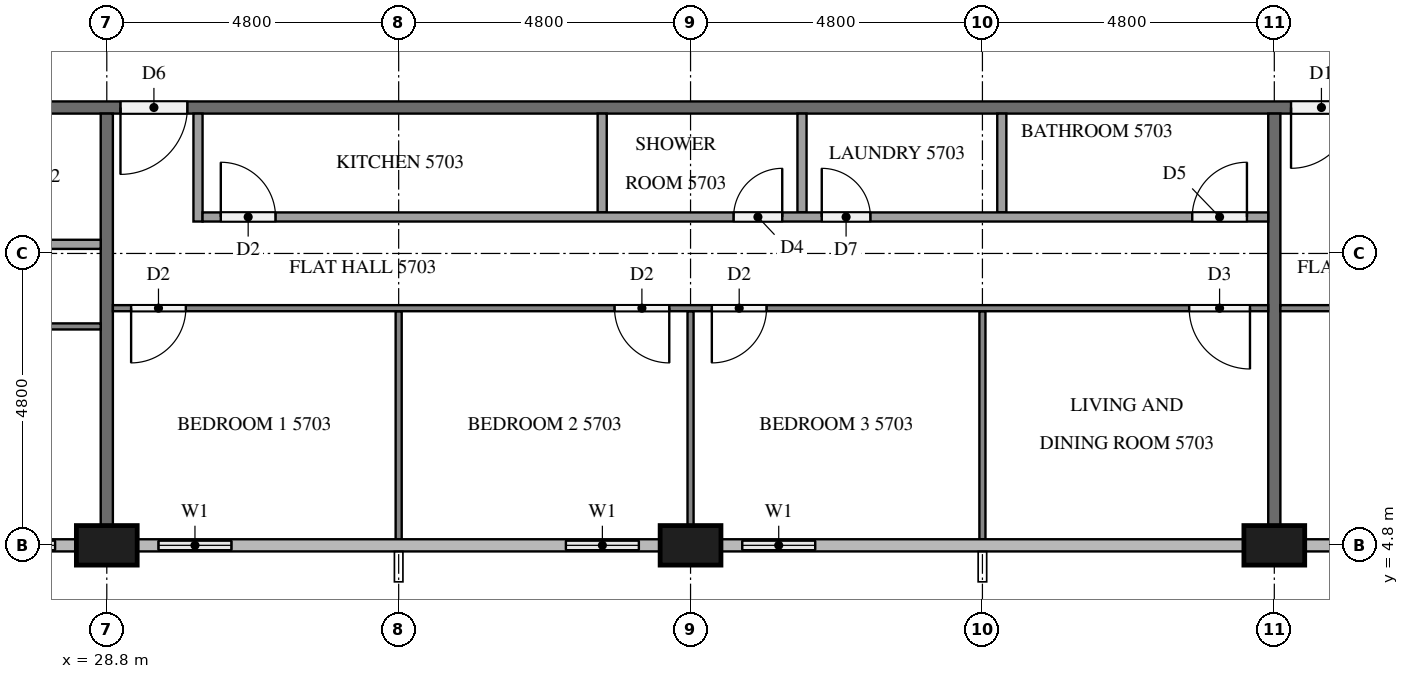
"""IFC4 building model, lengths in metres.
Left out: names, types, materials, properties, quantities, classifications, styles, units other than length and angle.
Written with IfcOpenShell. Run it as: python <this file> out.ifc"""

import sys

from ifc_helpers import new_model, si_unit, direction, frame, frame_2d, origin, origin_2d, place, context, subcontext, project, spatial, rectangle, extrude, element, fill, save


model = new_model("IFC4")
c1 = context("Model", 3, precision=1e-05, world=origin(), true_north=direction((0.0, 1.0)))
c2 = subcontext(c1, "Body", "Model", "MODEL_VIEW")
j1 = project(units=[si_unit("LENGTHUNIT", "METRE"), si_unit("PLANEANGLEUNIT", "RADIAN")], contexts=[c1])
p1 = place(None, origin())
s1 = spatial("IfcSite", under=j1, at=p1, CompositionType="ELEMENT")
p2 = place(p1, origin())
s2 = spatial("IfcBuilding", under=s1, at=p2, CompositionType="ELEMENT")
p3 = place(p2, frame((0.0, 0.0, 219.3)))
s3 = spatial("IfcBuildingStorey", under=s2, at=p3, CompositionType="ELEMENT", Elevation=219.3)
for number, where, z_axis, x_axis in (
    (1, (28.8, 4.8, 0.0), (0.0, 0.0, 1.0), (1.0, 0.0, 0.0)),
    (2, (38.4, 4.8, 0.0), (0.0, 0.0, 1.0), (1.0, 0.0, 0.0)),
    (3, (48.0, 4.8, 0.0), (0.0, 0.0, 1.0), (1.0, 0.0, 0.0)),
):
    element("IfcColumn", number, at=place(p3, frame(where, z_axis=z_axis, x_axis=x_axis)), inside=s3, PredefinedType="COLUMN", context=c2, shape_type="SweptSolid", body=[
        extrude(rectangle(XDim=1.0, YDim=0.65, at=origin_2d()), origin(), (0.0, 0.0, 1.0), 3.2),
    ])
p4 = place(p3, frame((26.4, 4.8, 0.0), z_axis=(0.0, 0.0, 1.0), x_axis=(1.0, 0.0, 0.0)))
e4 = element("IfcWall", 4, at=p4, inside=s3, PredefinedType="SOLIDWALL", context=c2, shape_type="SweptSolid", body=[
    extrude(rectangle(XDim=1.9, YDim=0.15, at=frame_2d((0.95, 0.0))), origin(), (0.0, 0.0, 1.0), 3.2),
])
p5 = place(p4, frame((0.35, 0.0, 0.9)))
e5 = element("IfcOpeningElement", 5, at=p5, cuts=e4, PredefinedType="OPENING", context=c2, shape_type="SweptSolid", body=[
    extrude(rectangle(XDim=1.2, YDim=1.4, at=frame_2d((0.6, 0.7))), frame((0.0, 0.085, 0.0), z_axis=(0.0, -1.0, 0.0), x_axis=(1.0, 0.0, 0.0)), (0.0, 0.0, 1.0), 0.17),
])
p6 = place(p3, frame((29.3, 4.8, 0.0), z_axis=(0.0, 0.0, 1.0), x_axis=(1.0, 0.0, 0.0)))
e6 = element("IfcWall", 6, at=p6, inside=s3, PredefinedType="SOLIDWALL", context=c2, shape_type="SweptSolid", body=[
    extrude(rectangle(XDim=1.9, YDim=0.15, at=frame_2d((0.95, 0.0))), origin(), (0.0, 0.0, 1.0), 3.2),
])
p7 = place(p6, frame((0.35, 0.0, 0.9)))
e7 = element("IfcOpeningElement", 7, at=p7, cuts=e6, PredefinedType="OPENING", context=c2, shape_type="SweptSolid", body=[
    extrude(rectangle(XDim=1.2, YDim=1.4, at=frame_2d((0.6, 0.7))), frame((0.0, 0.085, 0.0), z_axis=(0.0, -1.0, 0.0), x_axis=(1.0, 0.0, 0.0)), (0.0, 0.0, 1.0), 0.17),
])
p8 = place(p3, frame((36.0, 4.8, 0.0), z_axis=(0.0, 0.0, 1.0), x_axis=(1.0, 0.0, 0.0)))
e8 = element("IfcWall", 8, at=p8, inside=s3, PredefinedType="SOLIDWALL", context=c2, shape_type="SweptSolid", body=[
    extrude(rectangle(XDim=1.9, YDim=0.15, at=frame_2d((0.95, 0.0))), origin(), (0.0, 0.0, 1.0), 3.2),
])
p9 = place(p8, frame((0.35, 0.0, 0.9)))
e9 = element("IfcOpeningElement", 9, at=p9, cuts=e8, PredefinedType="OPENING", context=c2, shape_type="SweptSolid", body=[
    extrude(rectangle(XDim=1.2, YDim=1.4, at=frame_2d((0.6, 0.7))), frame((0.0, 0.085, 0.0), z_axis=(0.0, -1.0, 0.0), x_axis=(1.0, 0.0, 0.0)), (0.0, 0.0, 1.0), 0.17),
])
p10 = place(p3, frame((38.9, 4.8, 0.0), z_axis=(0.0, 0.0, 1.0), x_axis=(1.0, 0.0, 0.0)))
e10 = element("IfcWall", 10, at=p10, inside=s3, PredefinedType="SOLIDWALL", context=c2, shape_type="SweptSolid", body=[
    extrude(rectangle(XDim=1.9, YDim=0.15, at=frame_2d((0.95, 0.0))), origin(), (0.0, 0.0, 1.0), 3.2),
])
p11 = place(p10, frame((0.35, 0.0, 0.9)))
e11 = element("IfcOpeningElement", 11, at=p11, cuts=e10, PredefinedType="OPENING", context=c2, shape_type="SweptSolid", body=[
    extrude(rectangle(XDim=1.2, YDim=1.4, at=frame_2d((0.6, 0.7))), frame((0.0, 0.085, 0.0), z_axis=(0.0, -1.0, 0.0), x_axis=(1.0, 0.0, 0.0)), (0.0, 0.0, 1.0), 0.17),
])
p12 = place(p3, frame((50.5, 12.0, 0.0), z_axis=(0.0, 0.0, 1.0), x_axis=(-1.0, 0.0, 0.0)))
e12 = element("IfcWall", 12, at=p12, inside=s3, PredefinedType="PARTITIONING", context=c2, shape_type="SweptSolid", body=[
    extrude(rectangle(XDim=38.6, YDim=0.2, at=frame_2d((19.3, 0.0))), origin(), (0.0, 0.0, 1.0), 3.2),
])
p13 = place(p12, frame((36.375, 0.0, 0.0)))
e13 = element("IfcOpeningElement", 13, at=p13, cuts=e12, PredefinedType="OPENING", context=c2, shape_type="SweptSolid", body=[
    extrude(rectangle(XDim=1.0, YDim=2.1, at=frame_2d((0.5, 1.05))), frame((0.0, 0.11, 0.0), z_axis=(0.0, -1.0, 0.0), x_axis=(1.0, 0.0, 0.0)), (0.0, 0.0, 1.0), 0.22),
])
p14 = place(p12, frame((34.825, 0.0, 0.0)))
e14 = element("IfcOpeningElement", 14, at=p14, cuts=e12, PredefinedType="OPENING", context=c2, shape_type="SweptSolid", body=[
    extrude(rectangle(XDim=1.0, YDim=2.1, at=frame_2d((0.5, 1.05))), frame((0.0, 0.11, 0.0), z_axis=(0.0, -1.0, 0.0), x_axis=(1.0, 0.0, 0.0)), (0.0, 0.0, 1.0), 0.22),
])
p15 = place(p12, frame((20.375, 0.0, 0.0)))
e15 = element("IfcOpeningElement", 15, at=p15, cuts=e12, PredefinedType="OPENING", context=c2, shape_type="SweptSolid", body=[
    extrude(rectangle(XDim=1.1, YDim=2.1, at=frame_2d((0.55, 1.05))), frame((0.0, 0.11, 0.0), z_axis=(0.0, -1.0, 0.0), x_axis=(1.0, 0.0, 0.0)), (0.0, 0.0, 1.0), 0.22),
])
p16 = place(p12, frame((1.225, 0.0, 0.0)))
e16 = element("IfcOpeningElement", 16, at=p16, cuts=e12, PredefinedType="OPENING", context=c2, shape_type="SweptSolid", body=[
    extrude(rectangle(XDim=1.0, YDim=2.1, at=frame_2d((0.5, 1.05))), frame((0.0, 0.11, 0.0), z_axis=(0.0, -1.0, 0.0), x_axis=(1.0, 0.0, 0.0)), (0.0, 0.0, 1.0), 0.22),
])
for number, where, z_axis, x_axis in (
    (17, (28.8, 11.9, 0.0), (0.0, 0.0, 1.0), (0.0, -1.0, 0.0)),
    (18, (48.0, 11.9, 0.0), (0.0, 0.0, 1.0), (0.0, -1.0, 0.0)),
):
    element("IfcWall", number, at=place(p3, frame(where, z_axis=z_axis, x_axis=x_axis)), inside=s3, PredefinedType="PARTITIONING", context=c2, shape_type="SweptSolid", body=[
        extrude(rectangle(XDim=6.775, YDim=0.2, at=frame_2d((3.387, 0.0))), origin(), (0.0, 0.0, 1.0), 3.2),
    ])
p17 = place(p3, frame((28.7, 8.4, 0.0), z_axis=(0.0, 0.0, 1.0), x_axis=(-1.0, 0.0, 0.0)))
e19 = element("IfcWall", 19, at=p17, inside=s3, PredefinedType="PARTITIONING", context=c2, shape_type="SweptSolid", body=[
    extrude(rectangle(XDim=14.2, YDim=0.1, at=frame_2d((7.1, 0.0))), origin(), (0.0, 0.0, 1.0), 3.2),
])
p18 = place(p17, frame((12.9, 0.0, 0.0)))
e20 = element("IfcOpeningElement", 20, at=p18, cuts=e19, PredefinedType="OPENING", context=c2, shape_type="SweptSolid", body=[
    extrude(rectangle(XDim=1.0, YDim=2.1, at=frame_2d((0.5, 1.05))), frame((0.0, 0.06, 0.0), z_axis=(0.0, -1.0, 0.0), x_axis=(1.0, 0.0, 0.0)), (0.0, 0.0, 1.0), 0.12),
])
p19 = place(p17, frame((5.05, 0.0, 0.0)))
e21 = element("IfcOpeningElement", 21, at=p19, cuts=e19, PredefinedType="OPENING", context=c2, shape_type="SweptSolid", body=[
    extrude(rectangle(XDim=0.9, YDim=2.1, at=frame_2d((0.45, 1.05))), frame((0.0, 0.06, 0.0), z_axis=(0.0, -1.0, 0.0), x_axis=(1.0, 0.0, 0.0)), (0.0, 0.0, 1.0), 0.12),
])
p20 = place(p17, frame((3.45, 0.0, 0.0)))
e22 = element("IfcOpeningElement", 22, at=p20, cuts=e19, PredefinedType="OPENING", context=c2, shape_type="SweptSolid", body=[
    extrude(rectangle(XDim=0.9, YDim=2.1, at=frame_2d((0.45, 1.05))), frame((0.0, 0.06, 0.0), z_axis=(0.0, -1.0, 0.0), x_axis=(1.0, 0.0, 0.0)), (0.0, 0.0, 1.0), 0.12),
])
p21 = place(p3, frame((15.975, 9.75, 0.0), z_axis=(0.0, 0.0, 1.0), x_axis=(1.0, 0.0, 0.0)))
e23 = element("IfcWall", 23, at=p21, inside=s3, PredefinedType="PARTITIONING", context=c2, shape_type="SweptSolid", body=[
    extrude(rectangle(XDim=12.725, YDim=0.15, at=frame_2d((6.362, 0.0))), origin(), (0.0, 0.0, 1.0), 3.2),
])
p22 = place(p21, frame((0.3, 0.0, 0.0)))
e24 = element("IfcOpeningElement", 24, at=p22, cuts=e23, PredefinedType="OPENING", context=c2, shape_type="SweptSolid", body=[
    extrude(rectangle(XDim=0.8, YDim=2.1, at=frame_2d((0.4, 1.05))), frame((0.0, 0.085, 0.0), z_axis=(0.0, -1.0, 0.0), x_axis=(1.0, 0.0, 0.0)), (0.0, 0.0, 1.0), 0.17),
])
p23 = place(p21, frame((7.585, 0.0, 0.0)))
e25 = element("IfcOpeningElement", 25, at=p23, cuts=e23, PredefinedType="OPENING", context=c2, shape_type="SweptSolid", body=[
    extrude(rectangle(XDim=0.9, YDim=2.1, at=frame_2d((0.45, 1.05))), frame((0.0, 0.085, 0.0), z_axis=(0.0, -1.0, 0.0), x_axis=(1.0, 0.0, 0.0)), (0.0, 0.0, 1.0), 0.17),
])
p24 = place(p21, frame((9.135, 0.0, 0.0)))
e26 = element("IfcOpeningElement", 26, at=p24, cuts=e23, PredefinedType="OPENING", context=c2, shape_type="SweptSolid", body=[
    extrude(rectangle(XDim=0.9, YDim=2.1, at=frame_2d((0.45, 1.05))), frame((0.0, 0.085, 0.0), z_axis=(0.0, -1.0, 0.0), x_axis=(1.0, 0.0, 0.0)), (0.0, 0.0, 1.0), 0.17),
])
p25 = place(p3, frame((33.6, 8.65, 0.0), z_axis=(0.0, 0.0, 1.0), x_axis=(0.0, -1.0, 0.0)))
e27 = element("IfcWall", 27, at=p25, inside=s3, PredefinedType="PARTITIONING", context=c2, shape_type="SweptSolid", body=[
    extrude(rectangle(XDim=3.75, YDim=0.1, at=frame_2d((1.875, 0.0))), origin(), (0.0, 0.0, 1.0), 3.2),
])
p26 = place(p3, frame((38.4, 8.65, 0.0), z_axis=(0.0, 0.0, 1.0), x_axis=(0.0, -1.0, 0.0)))
e28 = element("IfcWall", 28, at=p26, inside=s3, PredefinedType="PARTITIONING", context=c2, shape_type="SweptSolid", body=[
    extrude(rectangle(XDim=3.525, YDim=0.1, at=frame_2d((1.762, 0.0))), origin(), (0.0, 0.0, 1.0), 3.2),
])
p27 = place(p3, frame((43.2, 8.65, 0.0), z_axis=(0.0, 0.0, 1.0), x_axis=(0.0, -1.0, 0.0)))
e29 = element("IfcWall", 29, at=p27, inside=s3, PredefinedType="PARTITIONING", context=c2, shape_type="SweptSolid", body=[
    extrude(rectangle(XDim=3.75, YDim=0.1, at=frame_2d((1.875, 0.0))), origin(), (0.0, 0.0, 1.0), 3.2),
])
p28 = place(p3, frame((47.9, 8.7, 0.0), z_axis=(0.0, 0.0, 1.0), x_axis=(-1.0, 0.0, 0.0)))
e30 = element("IfcWall", 30, at=p28, inside=s3, PredefinedType="PARTITIONING", context=c2, shape_type="SweptSolid", body=[
    extrude(rectangle(XDim=19.0, YDim=0.1, at=frame_2d((9.5, 0.0))), origin(), (0.0, 0.0, 1.0), 3.2),
])
p29 = place(p28, frame((17.8, 0.0, 0.0)))
e31 = element("IfcOpeningElement", 31, at=p29, cuts=e30, PredefinedType="OPENING", context=c2, shape_type="SweptSolid", body=[
    extrude(rectangle(XDim=0.9, YDim=2.1, at=frame_2d((0.45, 1.05))), frame((0.0, 0.06, 0.0), z_axis=(0.0, -1.0, 0.0), x_axis=(1.0, 0.0, 0.0)), (0.0, 0.0, 1.0), 0.12),
])
p30 = place(p28, frame((9.85, 0.0, 0.0)))
e32 = element("IfcOpeningElement", 32, at=p30, cuts=e30, PredefinedType="OPENING", context=c2, shape_type="SweptSolid", body=[
    extrude(rectangle(XDim=0.9, YDim=2.1, at=frame_2d((0.45, 1.05))), frame((0.0, 0.06, 0.0), z_axis=(0.0, -1.0, 0.0), x_axis=(1.0, 0.0, 0.0)), (0.0, 0.0, 1.0), 0.12),
])
p31 = place(p28, frame((8.25, 0.0, 0.0)))
e33 = element("IfcOpeningElement", 33, at=p31, cuts=e30, PredefinedType="OPENING", context=c2, shape_type="SweptSolid", body=[
    extrude(rectangle(XDim=0.9, YDim=2.1, at=frame_2d((0.45, 1.05))), frame((0.0, 0.06, 0.0), z_axis=(0.0, -1.0, 0.0), x_axis=(1.0, 0.0, 0.0)), (0.0, 0.0, 1.0), 0.12),
])
p32 = place(p28, frame((0.3, 0.0, 0.0)))
e34 = element("IfcOpeningElement", 34, at=p32, cuts=e30, PredefinedType="OPENING", context=c2, shape_type="SweptSolid", body=[
    extrude(rectangle(XDim=1.0, YDim=2.1, at=frame_2d((0.5, 1.05))), frame((0.0, 0.06, 0.0), z_axis=(0.0, -1.0, 0.0), x_axis=(1.0, 0.0, 0.0)), (0.0, 0.0, 1.0), 0.12),
])
for number, where, z_axis, x_axis in (
    (35, (36.947, 11.9, 0.0), (0.0, 0.0, 1.0), (0.0, -1.0, 0.0)),
    (36, (40.233, 11.9, 0.0), (0.0, 0.0, 1.0), (0.0, -1.0, 0.0)),
    (37, (43.519, 11.9, 0.0), (0.0, 0.0, 1.0), (0.0, -1.0, 0.0)),
):
    element("IfcWall", number, at=place(p3, frame(where, z_axis=z_axis, x_axis=x_axis)), inside=s3, PredefinedType="PARTITIONING", context=c2, shape_type="SweptSolid", body=[
        extrude(rectangle(XDim=1.625, YDim=0.15, at=frame_2d((0.812, 0.0))), origin(), (0.0, 0.0, 1.0), 3.2),
    ])
p33 = place(p3, frame((30.3, 11.9, 0.0), z_axis=(0.0, 0.0, 1.0), x_axis=(0.0, -1.0, 0.0)))
e38 = element("IfcWall", 38, at=p33, inside=s3, PredefinedType="PARTITIONING", context=c2, shape_type="SweptSolid", body=[
    extrude(rectangle(XDim=1.775, YDim=0.15, at=frame_2d((0.887, 0.0))), origin(), (0.0, 0.0, 1.0), 3.2),
])
p34 = place(p3, frame((30.375, 10.2, 0.0), z_axis=(0.0, 0.0, 1.0), x_axis=(1.0, 0.0, 0.0)))
e39 = element("IfcWall", 39, at=p34, inside=s3, PredefinedType="PARTITIONING", context=c2, shape_type="SweptSolid", body=[
    extrude(rectangle(XDim=17.525, YDim=0.15, at=frame_2d((8.762, 0.0))), origin(), (0.0, 0.0, 1.0), 3.2),
])
p35 = place(p34, frame((0.3, 0.0, 0.0)))
e40 = element("IfcOpeningElement", 40, at=p35, cuts=e39, PredefinedType="OPENING", context=c2, shape_type="SweptSolid", body=[
    extrude(rectangle(XDim=0.9, YDim=2.1, at=frame_2d((0.45, 1.05))), frame((0.0, 0.085, 0.0), z_axis=(0.0, -1.0, 0.0), x_axis=(1.0, 0.0, 0.0)), (0.0, 0.0, 1.0), 0.17),
])
p36 = place(p34, frame((8.733, 0.0, 0.0)))
e41 = element("IfcOpeningElement", 41, at=p36, cuts=e39, PredefinedType="OPENING", context=c2, shape_type="SweptSolid", body=[
    extrude(rectangle(XDim=0.8, YDim=2.1, at=frame_2d((0.4, 1.05))), frame((0.0, 0.085, 0.0), z_axis=(0.0, -1.0, 0.0), x_axis=(1.0, 0.0, 0.0)), (0.0, 0.0, 1.0), 0.17),
])
p37 = place(p34, frame((10.183, 0.0, 0.0)))
e42 = element("IfcOpeningElement", 42, at=p37, cuts=e39, PredefinedType="OPENING", context=c2, shape_type="SweptSolid", body=[
    extrude(rectangle(XDim=0.8, YDim=2.1, at=frame_2d((0.4, 1.05))), frame((0.0, 0.085, 0.0), z_axis=(0.0, -1.0, 0.0), x_axis=(1.0, 0.0, 0.0)), (0.0, 0.0, 1.0), 0.17),
])
p38 = place(p34, frame((16.275, 0.0, 0.0)))
e43 = element("IfcOpeningElement", 43, at=p38, cuts=e39, PredefinedType="OPENING", context=c2, shape_type="SweptSolid", body=[
    extrude(rectangle(XDim=0.9, YDim=2.1, at=frame_2d((0.45, 1.05))), frame((0.0, 0.085, 0.0), z_axis=(0.0, -1.0, 0.0), x_axis=(1.0, 0.0, 0.0)), (0.0, 0.0, 1.0), 0.17),
])
p39 = place(p3, frame((62.059, 8.7, 0.0), z_axis=(0.0, 0.0, 1.0), x_axis=(-1.0, 0.0, 0.0)))
e44 = element("IfcWall", 44, at=p39, inside=s3, PredefinedType="PARTITIONING", context=c2, shape_type="SweptSolid", body=[
    extrude(rectangle(XDim=13.959, YDim=0.1, at=frame_2d((6.979, 0.0))), origin(), (0.0, 0.0, 1.0), 3.2),
])
p40 = place(p39, frame((9.609, 0.0, 0.0)))
e45 = element("IfcOpeningElement", 45, at=p40, cuts=e44, PredefinedType="OPENING", context=c2, shape_type="SweptSolid", body=[
    extrude(rectangle(XDim=1.0, YDim=2.1, at=frame_2d((0.5, 1.05))), frame((0.0, 0.06, 0.0), z_axis=(0.0, -1.0, 0.0), x_axis=(1.0, 0.0, 0.0)), (0.0, 0.0, 1.0), 0.12),
])
p41 = place(p39, frame((8.009, 0.0, 0.0)))
e46 = element("IfcOpeningElement", 46, at=p41, cuts=e44, PredefinedType="OPENING", context=c2, shape_type="SweptSolid", body=[
    extrude(rectangle(XDim=0.9, YDim=2.1, at=frame_2d((0.45, 1.05))), frame((0.0, 0.06, 0.0), z_axis=(0.0, -1.0, 0.0), x_axis=(1.0, 0.0, 0.0)), (0.0, 0.0, 1.0), 0.12),
])
p42 = place(p39, frame((0.3, 0.0, 0.0)))
e47 = element("IfcOpeningElement", 47, at=p42, cuts=e44, PredefinedType="OPENING", context=c2, shape_type="SweptSolid", body=[
    extrude(rectangle(XDim=0.9, YDim=2.1, at=frame_2d((0.45, 1.05))), frame((0.0, 0.06, 0.0), z_axis=(0.0, -1.0, 0.0), x_axis=(1.0, 0.0, 0.0)), (0.0, 0.0, 1.0), 0.12),
])
p43 = place(p5, origin())
e48 = element("IfcWindow", 48, at=p43, inside=s3, PartitioningType="SINGLE_PANEL", PredefinedType="WINDOW", context=c2, shape_type="SweptSolid", body=[
    extrude(rectangle(XDim=1.2, YDim=1.4, at=frame_2d((0.6, 0.7))), frame((0.0, 0.03, 0.0), z_axis=(0.0, -1.0, 0.0), x_axis=(1.0, 0.0, 0.0)), (0.0, 0.0, 1.0), 0.06),
])
fill(e5, e48)
p44 = place(p7, origin())
e49 = element("IfcWindow", 49, at=p44, inside=s3, PartitioningType="SINGLE_PANEL", PredefinedType="WINDOW", context=c2, shape_type="SweptSolid", body=[
    extrude(rectangle(XDim=1.2, YDim=1.4, at=frame_2d((0.6, 0.7))), frame((0.0, 0.03, 0.0), z_axis=(0.0, -1.0, 0.0), x_axis=(1.0, 0.0, 0.0)), (0.0, 0.0, 1.0), 0.06),
])
fill(e7, e49)
p45 = place(p9, origin())
e50 = element("IfcWindow", 50, at=p45, inside=s3, PartitioningType="SINGLE_PANEL", PredefinedType="WINDOW", context=c2, shape_type="SweptSolid", body=[
    extrude(rectangle(XDim=1.2, YDim=1.4, at=frame_2d((0.6, 0.7))), frame((0.0, 0.03, 0.0), z_axis=(0.0, -1.0, 0.0), x_axis=(1.0, 0.0, 0.0)), (0.0, 0.0, 1.0), 0.06),
])
fill(e9, e50)
p46 = place(p11, origin())
e51 = element("IfcWindow", 51, at=p46, inside=s3, PartitioningType="SINGLE_PANEL", PredefinedType="WINDOW", context=c2, shape_type="SweptSolid", body=[
    extrude(rectangle(XDim=1.2, YDim=1.4, at=frame_2d((0.6, 0.7))), frame((0.0, 0.03, 0.0), z_axis=(0.0, -1.0, 0.0), x_axis=(1.0, 0.0, 0.0)), (0.0, 0.0, 1.0), 0.06),
])
fill(e11, e51)
p47 = place(p15, origin())
e52 = element("IfcDoor", 52, at=p47, inside=s3, OperationType="SINGLE_SWING_RIGHT", PredefinedType="DOOR", context=c2, shape_type="SweptSolid", body=[
    extrude(rectangle(XDim=1.1, YDim=2.1, at=frame_2d((0.55, 1.05))), frame((0.0, 0.025, 0.0), z_axis=(0.0, -1.0, 0.0), x_axis=(1.0, 0.0, 0.0)), (0.0, 0.0, 1.0), 0.05),
])
fill(e15, e52)
p48 = place(p16, origin())
e53 = element("IfcDoor", 53, at=p48, inside=s3, OperationType="SINGLE_SWING_RIGHT", PredefinedType="DOOR", context=c2, shape_type="SweptSolid", body=[
    extrude(rectangle(XDim=1.0, YDim=2.1, at=frame_2d((0.5, 1.05))), frame((0.0, 0.025, 0.0), z_axis=(0.0, -1.0, 0.0), x_axis=(1.0, 0.0, 0.0)), (0.0, 0.0, 1.0), 0.05),
])
fill(e16, e53)
p49 = place(p29, origin())
e54 = element("IfcDoor", 54, at=p49, inside=s3, OperationType="SINGLE_SWING_RIGHT", PredefinedType="DOOR", context=c2, shape_type="SweptSolid", body=[
    extrude(rectangle(XDim=0.9, YDim=2.1, at=frame_2d((0.45, 1.05))), frame((0.0, 0.025, 0.0), z_axis=(0.0, -1.0, 0.0), x_axis=(1.0, 0.0, 0.0)), (0.0, 0.0, 1.0), 0.05),
])
fill(e31, e54)
p50 = place(p30, origin())
e55 = element("IfcDoor", 55, at=p50, inside=s3, OperationType="SINGLE_SWING_LEFT", PredefinedType="DOOR", context=c2, shape_type="SweptSolid", body=[
    extrude(rectangle(XDim=0.9, YDim=2.1, at=frame_2d((0.45, 1.05))), frame((0.0, 0.025, 0.0), z_axis=(0.0, -1.0, 0.0), x_axis=(1.0, 0.0, 0.0)), (0.0, 0.0, 1.0), 0.05),
])
fill(e32, e55)
p51 = place(p31, origin())
e56 = element("IfcDoor", 56, at=p51, inside=s3, OperationType="SINGLE_SWING_RIGHT", PredefinedType="DOOR", context=c2, shape_type="SweptSolid", body=[
    extrude(rectangle(XDim=0.9, YDim=2.1, at=frame_2d((0.45, 1.05))), frame((0.0, 0.025, 0.0), z_axis=(0.0, -1.0, 0.0), x_axis=(1.0, 0.0, 0.0)), (0.0, 0.0, 1.0), 0.05),
])
fill(e33, e56)
p52 = place(p32, origin())
e57 = element("IfcDoor", 57, at=p52, inside=s3, OperationType="SINGLE_SWING_LEFT", PredefinedType="DOOR", context=c2, shape_type="SweptSolid", body=[
    extrude(rectangle(XDim=1.0, YDim=2.1, at=frame_2d((0.5, 1.05))), frame((0.0, 0.025, 0.0), z_axis=(0.0, -1.0, 0.0), x_axis=(1.0, 0.0, 0.0)), (0.0, 0.0, 1.0), 0.05),
])
fill(e34, e57)
p53 = place(p35, origin())
e58 = element("IfcDoor", 58, at=p53, inside=s3, OperationType="SINGLE_SWING_LEFT", PredefinedType="DOOR", context=c2, shape_type="SweptSolid", body=[
    extrude(rectangle(XDim=0.9, YDim=2.1, at=frame_2d((0.45, 1.05))), frame((0.0, 0.025, 0.0), z_axis=(0.0, -1.0, 0.0), x_axis=(1.0, 0.0, 0.0)), (0.0, 0.0, 1.0), 0.05),
])
fill(e40, e58)
p54 = place(p36, origin())
e59 = element("IfcDoor", 59, at=p54, inside=s3, OperationType="SINGLE_SWING_RIGHT", PredefinedType="DOOR", context=c2, shape_type="SweptSolid", body=[
    extrude(rectangle(XDim=0.8, YDim=2.1, at=frame_2d((0.4, 1.05))), frame((0.0, 0.025, 0.0), z_axis=(0.0, -1.0, 0.0), x_axis=(1.0, 0.0, 0.0)), (0.0, 0.0, 1.0), 0.05),
])
fill(e41, e59)
p55 = place(p37, origin())
e60 = element("IfcDoor", 60, at=p55, inside=s3, OperationType="SINGLE_SWING_LEFT", PredefinedType="DOOR", context=c2, shape_type="SweptSolid", body=[
    extrude(rectangle(XDim=0.8, YDim=2.1, at=frame_2d((0.4, 1.05))), frame((0.0, 0.025, 0.0), z_axis=(0.0, -1.0, 0.0), x_axis=(1.0, 0.0, 0.0)), (0.0, 0.0, 1.0), 0.05),
])
fill(e42, e60)
p56 = place(p38, origin())
e61 = element("IfcDoor", 61, at=p56, inside=s3, OperationType="SINGLE_SWING_RIGHT", PredefinedType="DOOR", context=c2, shape_type="SweptSolid", body=[
    extrude(rectangle(XDim=0.9, YDim=2.1, at=frame_2d((0.45, 1.05))), frame((0.0, 0.025, 0.0), z_axis=(0.0, -1.0, 0.0), x_axis=(1.0, 0.0, 0.0)), (0.0, 0.0, 1.0), 0.05),
])
fill(e43, e61)
save(model, sys.argv[1])
